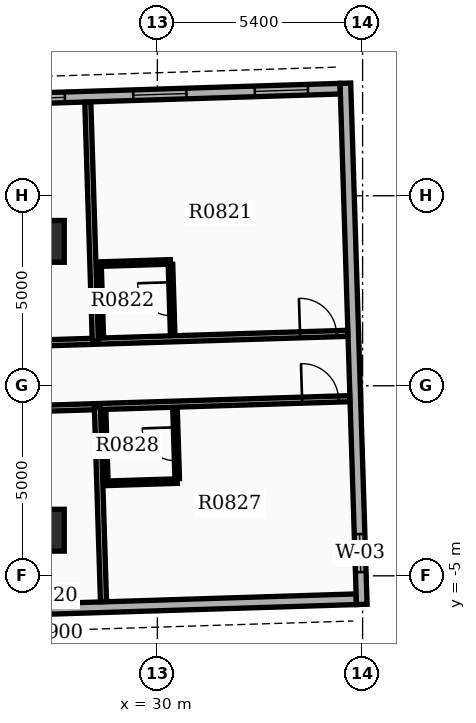
"""IFC4 building model, lengths in metres.
Left out: names, types, materials, properties, quantities, classifications, styles, units other than length and angle.
Written with IfcOpenShell. Run it as: python <this file> out.ifc"""

import sys

from ifc_helpers import new_model, si_unit, direction, frame, frame_2d, origin, origin_2d, place, context, subcontext, project, spatial, rectangle, extrude, element, fill, save


model = new_model("IFC4")
c1 = context("Model", 3, precision=1e-05, world=origin(), true_north=direction((0.0, 1.0)))
c2 = subcontext(c1, "Body", "Model", "MODEL_VIEW")
j1 = project(units=[si_unit("LENGTHUNIT", "METRE"), si_unit("PLANEANGLEUNIT", "RADIAN")], contexts=[c1])
p1 = place(None, origin())
s1 = spatial("IfcSite", under=j1, at=p1, CompositionType="ELEMENT")
p2 = place(p1, origin())
s2 = spatial("IfcBuilding", under=s1, at=p2, CompositionType="ELEMENT")
p3 = place(p2, frame((0.0, 0.0, 56.1)))
s3 = spatial("IfcBuildingStorey", under=s2, at=p3, CompositionType="ELEMENT", Elevation=56.1)
for number, where, z_axis, x_axis in (
    (1, (27.0, -3.8, 0.0), (0.0, 0.0, 1.0), (1.0, 0.0, 0.0)),
    (2, (27.0, 3.8, 0.0), (0.0, 0.0, 1.0), (1.0, 0.0, 0.0)),
):
    element("IfcColumn", number, at=place(p3, frame(where, z_axis=z_axis, x_axis=x_axis)), inside=s3, PredefinedType="COLUMN", context=c2, shape_type="SweptSolid", body=[
        extrude(rectangle(XDim=1.1, YDim=1.1, at=origin_2d()), origin(), (0.0, 0.0, 1.0), 3.9),
    ])
p4 = place(p3, frame((15.144, -6.247, 0.0), z_axis=(0.0, 0.0, 1.0), x_axis=(0.999506955354, 0.031398187845, 0.0)))
e3 = element("IfcWall", 3, at=p4, inside=s3, PredefinedType="STANDARD", context=c2, shape_type="SweptSolid", body=[
    extrude(rectangle(XDim=20.1, YDim=0.28, at=frame_2d((10.05, 0.0))), origin(), (0.0, 0.0, 1.0), 2.91),
])
p5 = place(p4, frame((0.85, 0.0, 0.8)))
e4 = element("IfcOpeningElement", 4, at=p5, cuts=e3, PredefinedType="OPENING", context=c2, shape_type="SweptSolid", body=[
    extrude(rectangle(XDim=1.4, YDim=1.6, at=frame_2d((0.7, 0.8))), frame((0.0, 0.15, 0.0), z_axis=(0.0, -1.0, 0.0), x_axis=(1.0, 0.0, 0.0)), (0.0, 0.0, 1.0), 0.3),
])
p6 = place(p4, frame((4.05, 0.0, 0.8)))
e5 = element("IfcOpeningElement", 5, at=p6, cuts=e3, PredefinedType="OPENING", context=c2, shape_type="SweptSolid", body=[
    extrude(rectangle(XDim=1.4, YDim=1.6, at=frame_2d((0.7, 0.8))), frame((0.0, 0.15, 0.0), z_axis=(0.0, -1.0, 0.0), x_axis=(1.0, 0.0, 0.0)), (0.0, 0.0, 1.0), 0.3),
])
p7 = place(p4, frame((7.25, 0.0, 0.8)))
e6 = element("IfcOpeningElement", 6, at=p7, cuts=e3, PredefinedType="OPENING", context=c2, shape_type="SweptSolid", body=[
    extrude(rectangle(XDim=1.4, YDim=1.6, at=frame_2d((0.7, 0.8))), frame((0.0, 0.15, 0.0), z_axis=(0.0, -1.0, 0.0), x_axis=(1.0, 0.0, 0.0)), (0.0, 0.0, 1.0), 0.3),
])
p8 = place(p4, frame((10.45, 0.0, 0.8)))
e7 = element("IfcOpeningElement", 7, at=p8, cuts=e3, PredefinedType="OPENING", context=c2, shape_type="SweptSolid", body=[
    extrude(rectangle(XDim=1.4, YDim=1.6, at=frame_2d((0.7, 0.8))), frame((0.0, 0.15, 0.0), z_axis=(0.0, -1.0, 0.0), x_axis=(1.0, 0.0, 0.0)), (0.0, 0.0, 1.0), 0.3),
])
p9 = place(p3, frame((34.812, 7.817, 0.0), z_axis=(0.0, 0.0, 1.0), x_axis=(-0.999506574096, -0.031410322165, 0.0)))
e8 = element("IfcWall", 8, at=p9, inside=s3, PredefinedType="STANDARD", context=c2, shape_type="SweptSolid", body=[
    extrude(rectangle(XDim=20.1, YDim=0.28, at=frame_2d((10.05, 0.0))), origin(), (0.0, 0.0, 1.0), 2.91),
])
p10 = place(p9, frame((0.85, 0.0, 0.8)))
e9 = element("IfcOpeningElement", 9, at=p10, cuts=e8, PredefinedType="OPENING", context=c2, shape_type="SweptSolid", body=[
    extrude(rectangle(XDim=1.4, YDim=1.6, at=frame_2d((0.7, 0.8))), frame((0.0, 0.15, 0.0), z_axis=(0.0, -1.0, 0.0), x_axis=(1.0, 0.0, 0.0)), (0.0, 0.0, 1.0), 0.3),
])
p11 = place(p9, frame((4.05, 0.0, 0.8)))
e10 = element("IfcOpeningElement", 10, at=p11, cuts=e8, PredefinedType="OPENING", context=c2, shape_type="SweptSolid", body=[
    extrude(rectangle(XDim=1.4, YDim=1.6, at=frame_2d((0.7, 0.8))), frame((0.0, 0.15, 0.0), z_axis=(0.0, -1.0, 0.0), x_axis=(1.0, 0.0, 0.0)), (0.0, 0.0, 1.0), 0.3),
])
p12 = place(p9, frame((7.25, 0.0, 0.8)))
e11 = element("IfcOpeningElement", 11, at=p12, cuts=e8, PredefinedType="OPENING", context=c2, shape_type="SweptSolid", body=[
    extrude(rectangle(XDim=1.4, YDim=1.6, at=frame_2d((0.7, 0.8))), frame((0.0, 0.15, 0.0), z_axis=(0.0, -1.0, 0.0), x_axis=(1.0, 0.0, 0.0)), (0.0, 0.0, 1.0), 0.3),
])
p13 = place(p9, frame((10.45, 0.0, 0.8)))
e12 = element("IfcOpeningElement", 12, at=p13, cuts=e8, PredefinedType="OPENING", context=c2, shape_type="SweptSolid", body=[
    extrude(rectangle(XDim=1.4, YDim=1.6, at=frame_2d((0.7, 0.8))), frame((0.0, 0.15, 0.0), z_axis=(0.0, -1.0, 0.0), x_axis=(1.0, 0.0, 0.0)), (0.0, 0.0, 1.0), 0.3),
])
p14 = place(p9, frame((14.035, 0.0, 0.85)))
e13 = element("IfcOpeningElement", 13, at=p14, cuts=e8, PredefinedType="OPENING", context=c2, shape_type="SweptSolid", body=[
    extrude(rectangle(XDim=1.2, YDim=1.6, at=frame_2d((0.6, 0.8))), frame((0.0, 0.15, 0.0), z_axis=(0.0, -1.0, 0.0), x_axis=(1.0, 0.0, 0.0)), (0.0, 0.0, 1.0), 0.3),
])
p15 = place(p3, frame((35.378, -5.752, 0.0), z_axis=(0.0, 0.0, 1.0), x_axis=(-0.031406966164, 0.999506679556, 0.0)))
e14 = element("IfcWall", 14, at=p15, inside=s3, PredefinedType="STANDARD", context=c2, shape_type="SweptSolid", body=[
    extrude(rectangle(XDim=13.72, YDim=0.28, at=frame_2d((6.86, 0.0))), origin(), (0.0, 0.0, 1.0), 2.91),
])
p16 = place(p15, frame((0.85, 0.0, 0.85)))
e15 = element("IfcOpeningElement", 15, at=p16, cuts=e14, PredefinedType="OPENING", context=c2, shape_type="SweptSolid", body=[
    extrude(rectangle(XDim=1.0, YDim=1.5, at=frame_2d((0.5, 0.75))), frame((0.0, 0.15, 0.0), z_axis=(0.0, -1.0, 0.0), x_axis=(1.0, 0.0, 0.0)), (0.0, 0.0, 1.0), 0.3),
])
p17 = place(p3, frame((14.834, 0.746, 0.0), z_axis=(0.0, 0.0, 1.0), x_axis=(0.99950639469, 0.031416030536, 0.0)))
e16 = element("IfcWall", 16, at=p17, inside=s3, PredefinedType="PARTITIONING", context=c2, shape_type="SweptSolid", body=[
    extrude(rectangle(XDim=20.182, YDim=0.16, at=frame_2d((10.091, 0.0))), origin(), (0.0, 0.0, 1.0), 2.9),
])
p18 = place(p17, frame((2.626, 0.0, 0.0)))
e17 = element("IfcOpeningElement", 17, at=p18, cuts=e16, PredefinedType="OPENING", context=c2, shape_type="SweptSolid", body=[
    extrude(rectangle(XDim=0.96, YDim=2.15, at=frame_2d((0.48, 1.075))), frame((0.0, 0.09, 0.0), z_axis=(0.0, -1.0, 0.0), x_axis=(1.0, 0.0, 0.0)), (0.0, 0.0, 1.0), 0.18),
])
p19 = place(p17, frame((9.143, 0.0, 0.0)))
e18 = element("IfcOpeningElement", 18, at=p19, cuts=e16, PredefinedType="OPENING", context=c2, shape_type="SweptSolid", body=[
    extrude(rectangle(XDim=0.96, YDim=2.15, at=frame_2d((0.48, 1.075))), frame((0.0, 0.09, 0.0), z_axis=(0.0, -1.0, 0.0), x_axis=(1.0, 0.0, 0.0)), (0.0, 0.0, 1.0), 0.18),
])
p20 = place(p17, frame((18.93, 0.0, 0.0)))
e19 = element("IfcOpeningElement", 19, at=p20, cuts=e16, PredefinedType="OPENING", context=c2, shape_type="SweptSolid", body=[
    extrude(rectangle(XDim=0.96, YDim=2.15, at=frame_2d((0.48, 1.075))), frame((0.0, 0.09, 0.0), z_axis=(0.0, -1.0, 0.0), x_axis=(1.0, 0.0, 0.0)), (0.0, 0.0, 1.0), 0.18),
])
p21 = place(p3, frame((28.367, 1.172, 0.0), z_axis=(0.0, 0.0, 1.0), x_axis=(-0.031429784908, 0.999505962274, 0.0)))
e20 = element("IfcWall", 20, at=p21, inside=s3, PredefinedType="PARTITIONING", context=c2, shape_type="SweptSolid", body=[
    extrude(rectangle(XDim=6.292, YDim=0.16, at=frame_2d((3.146, 0.0))), origin(), (0.0, 0.0, 1.0), 2.9),
])
p22 = place(p3, frame((30.402, 1.375, 0.0), z_axis=(0.0, 0.0, 1.0), x_axis=(-0.03152371574, 0.999503004171, 0.0)))
e21 = element("IfcWall", 21, at=p22, inside=s3, PredefinedType="PARTITIONING", context=c2, shape_type="SweptSolid", body=[
    extrude(rectangle(XDim=1.82, YDim=0.12, at=frame_2d((0.91, 0.0))), origin(), (0.0, 0.0, 1.0), 2.9),
])
p23 = place(p22, frame((0.47, 0.0, 0.0)))
e22 = element("IfcOpeningElement", 22, at=p23, cuts=e21, PredefinedType="OPENING", context=c2, shape_type="SweptSolid", body=[
    extrude(rectangle(XDim=0.88, YDim=2.1, at=frame_2d((0.44, 1.05))), frame((0.0, 0.07, 0.0), z_axis=(0.0, -1.0, 0.0), x_axis=(1.0, 0.0, 0.0)), (0.0, 0.0, 1.0), 0.14),
])
p24 = place(p3, frame((28.523, 1.317, 0.0), z_axis=(0.0, 0.0, 1.0), x_axis=(-0.031389704724, 0.999507221803, 0.0)))
e23 = element("IfcWall", 23, at=p24, inside=s3, PredefinedType="PARTITIONING", context=c2, shape_type="SweptSolid", body=[
    extrude(rectangle(XDim=1.82, YDim=0.12, at=frame_2d((0.91, 0.0))), origin(), (0.0, 0.0, 1.0), 2.9),
])
p25 = place(p3, frame((28.463, 3.201, 0.0), z_axis=(0.0, 0.0, 1.0), x_axis=(0.999506103526, 0.031425292588, 0.0)))
e24 = element("IfcWall", 24, at=p25, inside=s3, PredefinedType="PARTITIONING", context=c2, shape_type="SweptSolid", body=[
    extrude(rectangle(XDim=1.88, YDim=0.12, at=frame_2d((0.94, 0.0))), origin(), (0.0, 0.0, 1.0), 2.9),
])
p26 = place(p3, frame((14.888, -0.973, 0.0), z_axis=(0.0, 0.0, 1.0), x_axis=(0.99950639469, 0.031416030536, 0.0)))
e25 = element("IfcWall", 25, at=p26, inside=s3, PredefinedType="PARTITIONING", context=c2, shape_type="SweptSolid", body=[
    extrude(rectangle(XDim=20.182, YDim=0.16, at=frame_2d((10.091, 0.0))), origin(), (0.0, 0.0, 1.0), 2.9),
])
p27 = place(p26, frame((2.626, 0.0, 0.0)))
e26 = element("IfcOpeningElement", 26, at=p27, cuts=e25, PredefinedType="OPENING", context=c2, shape_type="SweptSolid", body=[
    extrude(rectangle(XDim=0.96, YDim=2.15, at=frame_2d((0.48, 1.075))), frame((0.0, 0.09, 0.0), z_axis=(0.0, -1.0, 0.0), x_axis=(1.0, 0.0, 0.0)), (0.0, 0.0, 1.0), 0.18),
])
p28 = place(p26, frame((9.143, 0.0, 0.0)))
e27 = element("IfcOpeningElement", 27, at=p28, cuts=e25, PredefinedType="OPENING", context=c2, shape_type="SweptSolid", body=[
    extrude(rectangle(XDim=0.96, YDim=2.15, at=frame_2d((0.48, 1.075))), frame((0.0, 0.09, 0.0), z_axis=(0.0, -1.0, 0.0), x_axis=(1.0, 0.0, 0.0)), (0.0, 0.0, 1.0), 0.18),
])
p29 = place(p26, frame((18.93, 0.0, 0.0)))
e28 = element("IfcOpeningElement", 28, at=p29, cuts=e25, PredefinedType="OPENING", context=c2, shape_type="SweptSolid", body=[
    extrude(rectangle(XDim=0.96, YDim=2.15, at=frame_2d((0.48, 1.075))), frame((0.0, 0.09, 0.0), z_axis=(0.0, -1.0, 0.0), x_axis=(1.0, 0.0, 0.0)), (0.0, 0.0, 1.0), 0.18),
])
p30 = place(p3, frame((28.421, -0.548, 0.0), z_axis=(0.0, 0.0, 1.0), x_axis=(0.031445650224, -0.999505463258, 0.0)))
e29 = element("IfcWall", 29, at=p30, inside=s3, PredefinedType="PARTITIONING", context=c2, shape_type="SweptSolid", body=[
    extrude(rectangle(XDim=5.132, YDim=0.16, at=frame_2d((2.566, 0.0))), origin(), (0.0, 0.0, 1.0), 2.9),
])
p31 = place(p3, frame((30.522, -2.442, 0.0), z_axis=(0.0, 0.0, 1.0), x_axis=(-0.031389704724, 0.999507221803, 0.0)))
e30 = element("IfcWall", 30, at=p31, inside=s3, PredefinedType="PARTITIONING", context=c2, shape_type="SweptSolid", body=[
    extrude(rectangle(XDim=1.82, YDim=0.12, at=frame_2d((0.91, 0.0))), origin(), (0.0, 0.0, 1.0), 2.9),
])
p32 = place(p31, frame((0.47, 0.0, 0.0)))
e31 = element("IfcOpeningElement", 31, at=p32, cuts=e30, PredefinedType="OPENING", context=c2, shape_type="SweptSolid", body=[
    extrude(rectangle(XDim=0.88, YDim=2.1, at=frame_2d((0.44, 1.05))), frame((0.0, 0.07, 0.0), z_axis=(0.0, -1.0, 0.0), x_axis=(1.0, 0.0, 0.0)), (0.0, 0.0, 1.0), 0.14),
])
p33 = place(p3, frame((28.643, -2.501, 0.0), z_axis=(0.0, 0.0, 1.0), x_axis=(-0.031389704724, 0.999507221803, 0.0)))
e32 = element("IfcWall", 32, at=p33, inside=s3, PredefinedType="PARTITIONING", context=c2, shape_type="SweptSolid", body=[
    extrude(rectangle(XDim=1.82, YDim=0.12, at=frame_2d((0.91, 0.0))), origin(), (0.0, 0.0, 1.0), 2.9),
])
p34 = place(p3, frame((28.645, -2.566, 0.0), z_axis=(0.0, 0.0, 1.0), x_axis=(0.999510046681, 0.031299625942, 0.0)))
e33 = element("IfcWall", 33, at=p34, inside=s3, PredefinedType="PARTITIONING", context=c2, shape_type="SweptSolid", body=[
    extrude(rectangle(XDim=1.88, YDim=0.12, at=frame_2d((0.94, 0.0))), origin(), (0.0, 0.0, 1.0), 2.9),
])
p35 = place(p10, origin())
e34 = element("IfcWindow", 34, at=p35, inside=s3, PartitioningType="SINGLE_PANEL", PredefinedType="WINDOW", context=c2, shape_type="SweptSolid", body=[
    extrude(rectangle(XDim=1.4, YDim=1.6, at=frame_2d((0.7, 0.8))), frame((0.0, 0.03, 0.0), z_axis=(0.0, -1.0, 0.0), x_axis=(1.0, 0.0, 0.0)), (0.0, 0.0, 1.0), 0.06),
])
fill(e9, e34)
p36 = place(p11, origin())
e35 = element("IfcWindow", 35, at=p36, inside=s3, PartitioningType="SINGLE_PANEL", PredefinedType="WINDOW", context=c2, shape_type="SweptSolid", body=[
    extrude(rectangle(XDim=1.4, YDim=1.6, at=frame_2d((0.7, 0.8))), frame((0.0, 0.03, 0.0), z_axis=(0.0, -1.0, 0.0), x_axis=(1.0, 0.0, 0.0)), (0.0, 0.0, 1.0), 0.06),
])
fill(e10, e35)
p37 = place(p12, origin())
e36 = element("IfcWindow", 36, at=p37, inside=s3, PartitioningType="SINGLE_PANEL", PredefinedType="WINDOW", context=c2, shape_type="SweptSolid", body=[
    extrude(rectangle(XDim=1.4, YDim=1.6, at=frame_2d((0.7, 0.8))), frame((0.0, 0.03, 0.0), z_axis=(0.0, -1.0, 0.0), x_axis=(1.0, 0.0, 0.0)), (0.0, 0.0, 1.0), 0.06),
])
fill(e11, e36)
p38 = place(p16, origin())
e37 = element("IfcWindow", 37, at=p38, inside=s3, PartitioningType="SINGLE_PANEL", PredefinedType="WINDOW", context=c2, shape_type="SweptSolid", body=[
    extrude(rectangle(XDim=1.0, YDim=1.5, at=frame_2d((0.5, 0.75))), frame((0.0, 0.03, 0.0), z_axis=(0.0, -1.0, 0.0), x_axis=(1.0, 0.0, 0.0)), (0.0, 0.0, 1.0), 0.06),
])
fill(e15, e37)
p39 = place(p20, origin())
e38 = element("IfcDoor", 38, at=p39, inside=s3, OperationType="SINGLE_SWING_LEFT", PredefinedType="DOOR", context=c2, shape_type="SweptSolid", body=[
    extrude(rectangle(XDim=0.96, YDim=2.15, at=frame_2d((0.48, 1.075))), frame((0.0, 0.025, 0.0), z_axis=(0.0, -1.0, 0.0), x_axis=(1.0, 0.0, 0.0)), (0.0, 0.0, 1.0), 0.05),
])
fill(e19, e38)
p40 = place(p23, origin())
e39 = element("IfcDoor", 39, at=p40, inside=s3, OperationType="SINGLE_SWING_RIGHT", PredefinedType="DOOR", context=c2, shape_type="SweptSolid", body=[
    extrude(rectangle(XDim=0.88, YDim=2.1, at=frame_2d((0.44, 1.05))), frame((0.0, 0.025, 0.0), z_axis=(0.0, -1.0, 0.0), x_axis=(1.0, 0.0, 0.0)), (0.0, 0.0, 1.0), 0.05),
])
fill(e22, e39)
p41 = place(p29, origin())
e40 = element("IfcDoor", 40, at=p41, inside=s3, OperationType="SINGLE_SWING_LEFT", PredefinedType="DOOR", context=c2, shape_type="SweptSolid", body=[
    extrude(rectangle(XDim=0.96, YDim=2.15, at=frame_2d((0.48, 1.075))), frame((0.0, 0.025, 0.0), z_axis=(0.0, -1.0, 0.0), x_axis=(1.0, 0.0, 0.0)), (0.0, 0.0, 1.0), 0.05),
])
fill(e28, e40)
p42 = place(p32, origin())
e41 = element("IfcDoor", 41, at=p42, inside=s3, OperationType="SINGLE_SWING_RIGHT", PredefinedType="DOOR", context=c2, shape_type="SweptSolid", body=[
    extrude(rectangle(XDim=0.88, YDim=2.1, at=frame_2d((0.44, 1.05))), frame((0.0, 0.025, 0.0), z_axis=(0.0, -1.0, 0.0), x_axis=(1.0, 0.0, 0.0)), (0.0, 0.0, 1.0), 0.05),
])
fill(e31, e41)
save(model, sys.argv[1])
